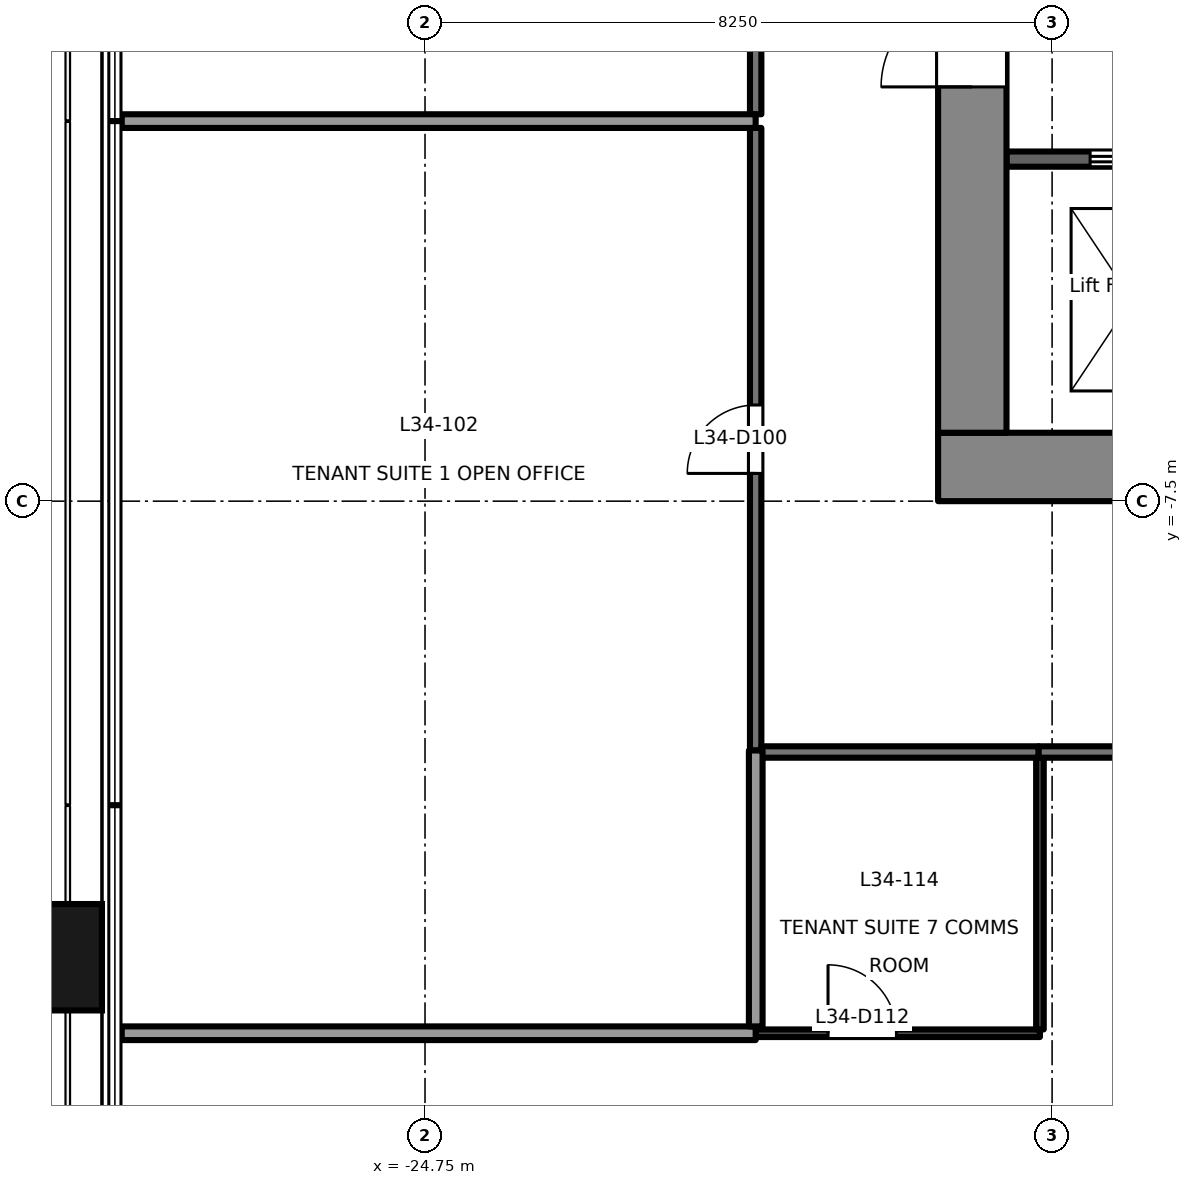
"""IFC4 building model, lengths in metres.
Left out: names, types, materials, properties, quantities, classifications, styles, units other than length and angle.
Written with IfcOpenShell. Run it as: python <this file> out.ifc"""

import sys

from ifc_helpers import new_model, si_unit, direction, frame, frame_2d, origin, origin_2d, place, context, subcontext, project, spatial, rectangle, extrude, element, fill, save


model = new_model("IFC4")
c1 = context("Model", 3, precision=1e-05, world=origin(), true_north=direction((0.0, 1.0)))
c2 = subcontext(c1, "Body", "Model", "MODEL_VIEW")
j1 = project(units=[si_unit("LENGTHUNIT", "METRE"), si_unit("PLANEANGLEUNIT", "RADIAN")], contexts=[c1])
p1 = place(None, origin())
s1 = spatial("IfcSite", under=j1, at=p1, CompositionType="ELEMENT")
p2 = place(p1, origin())
s2 = spatial("IfcBuilding", under=s1, at=p2, CompositionType="ELEMENT")
p3 = place(p2, frame((0.0, 0.0, 150.1)))
s3 = spatial("IfcBuildingStorey", under=s2, at=p3, CompositionType="ELEMENT", Elevation=150.1)
p4 = place(p3, frame((-29.9, -13.5, -0.2), z_axis=(0.0, 0.0, 1.0), x_axis=(0.0, 1.0, 0.0)))
e1 = element("IfcColumn", 1, at=p4, inside=s3, PredefinedType="COLUMN", context=c2, shape_type="SweptSolid", body=[
    extrude(rectangle(XDim=1.4, YDim=1.8, at=origin_2d()), origin(), (0.0, 0.0, 1.0), 4.0),
])
p5 = place(p3, frame((-18.0, -7.05, -0.2), z_axis=(0.0, 0.0, 1.0), x_axis=(1.0, 0.0, 0.0)))
e2 = element("IfcWall", 2, at=p5, inside=s3, PredefinedType="SHEAR", context=c2, shape_type="SweptSolid", body=[
    extrude(rectangle(XDim=36.0, YDim=0.9, at=frame_2d((18.0, 0.0))), origin(), (0.0, 0.0, 1.0), 4.0),
])
p6 = place(p5, frame((7.8, 0.0, 0.2)))
e3 = element("IfcOpeningElement", 3, at=p6, cuts=e2, PredefinedType="OPENING", context=c2, shape_type="SweptSolid", body=[
    extrude(rectangle(XDim=2.4, YDim=2.1, at=frame_2d((1.2, 1.05))), frame((0.0, 0.46, 0.0), z_axis=(0.0, -1.0, 0.0), x_axis=(1.0, 0.0, 0.0)), (0.0, 0.0, 1.0), 0.921),
])
p7 = place(p5, frame((17.4, 0.0, 0.2)))
e4 = element("IfcOpeningElement", 4, at=p7, cuts=e2, PredefinedType="OPENING", context=c2, shape_type="SweptSolid", body=[
    extrude(rectangle(XDim=1.2, YDim=2.1, at=frame_2d((0.6, 1.05))), frame((0.0, 0.46, 0.0), z_axis=(0.0, -1.0, 0.0), x_axis=(1.0, 0.0, 0.0)), (0.0, 0.0, 1.0), 0.921),
])
p8 = place(p5, frame((26.1, 0.0, 0.2)))
e5 = element("IfcOpeningElement", 5, at=p8, cuts=e2, PredefinedType="OPENING", context=c2, shape_type="SweptSolid", body=[
    extrude(rectangle(XDim=2.4, YDim=2.1, at=frame_2d((1.2, 1.05))), frame((0.0, 0.46, 0.0), z_axis=(0.0, -1.0, 0.0), x_axis=(1.0, 0.0, 0.0)), (0.0, 0.0, 1.0), 0.921),
])
p9 = place(p3, frame((-17.55, -6.6, -0.2), z_axis=(0.0, 0.0, 1.0), x_axis=(0.0, 1.0, 0.0)))
e6 = element("IfcWall", 6, at=p9, inside=s3, PredefinedType="SHEAR", context=c2, shape_type="SweptSolid", body=[
    extrude(rectangle(XDim=13.2, YDim=0.9, at=frame_2d((6.6, 0.0))), origin(), (0.0, 0.0, 1.0), 4.0),
])
p10 = place(p9, frame((4.55, 0.0, 0.2)))
e7 = element("IfcOpeningElement", 7, at=p10, cuts=e6, PredefinedType="OPENING", context=c2, shape_type="SweptSolid", body=[
    extrude(rectangle(XDim=1.2, YDim=2.1, at=frame_2d((0.6, 1.05))), frame((0.0, 0.46, 0.0), z_axis=(0.0, -1.0, 0.0), x_axis=(1.0, 0.0, 0.0)), (0.0, 0.0, 1.0), 0.921),
])
p11 = place(p3, frame((-17.1, -3.0, 0.0), z_axis=(0.0, 0.0, 1.0), x_axis=(1.0, 0.0, 0.0)))
e8 = element("IfcWall", 8, at=p11, inside=s3, PredefinedType="PARTITIONING", context=c2, shape_type="SweptSolid", body=[
    extrude(rectangle(XDim=3.3, YDim=0.2, at=frame_2d((1.65, 0.0))), origin(), (0.0, 0.0, 1.0), 3.8),
])
p12 = place(p11, frame((1.1, 0.0, 0.0)))
e9 = element("IfcOpeningElement", 9, at=p12, cuts=e8, PredefinedType="OPENING", context=c2, shape_type="SweptSolid", body=[
    extrude(rectangle(XDim=1.1, YDim=2.1, at=frame_2d((0.55, 1.05))), frame((0.0, 0.111, 0.0), z_axis=(0.0, -1.0, 0.0), x_axis=(1.0, 0.0, 0.0)), (0.0, 0.0, 1.0), 0.221),
])
p13 = place(p3, frame((-20.4, -10.78, 0.0), z_axis=(0.0, 0.0, 1.0), x_axis=(0.0, 1.0, 0.0)))
e10 = element("IfcWall", 10, at=p13, inside=s3, PredefinedType="PARTITIONING", context=c2, shape_type="SweptSolid", body=[
    extrude(rectangle(XDim=8.19, YDim=0.15, at=frame_2d((4.095, 0.0))), origin(), (0.0, 0.0, 1.0), 3.3),
])
p14 = place(p13, frame((3.645, 0.0, 0.0)))
e11 = element("IfcOpeningElement", 11, at=p14, cuts=e10, PredefinedType="OPENING", context=c2, shape_type="SweptSolid", body=[
    extrude(rectangle(XDim=0.9, YDim=2.1, at=frame_2d((0.45, 1.05))), frame((0.0, 0.085, 0.0), z_axis=(0.0, -1.0, 0.0), x_axis=(1.0, 0.0, 0.0)), (0.0, 0.0, 1.0), 0.171),
])
p15 = place(p3, frame((-20.4, -2.41, 0.0), z_axis=(0.0, 0.0, 1.0), x_axis=(0.0, 1.0, 0.0)))
e12 = element("IfcWall", 12, at=p15, inside=s3, PredefinedType="PARTITIONING", context=c2, shape_type="SweptSolid", body=[
    extrude(rectangle(XDim=9.91, YDim=0.15, at=frame_2d((4.955, 0.0))), origin(), (0.0, 0.0, 1.0), 3.3),
])
p16 = place(p15, frame((4.205, 0.0, 0.0)))
e13 = element("IfcOpeningElement", 13, at=p16, cuts=e12, PredefinedType="OPENING", context=c2, shape_type="SweptSolid", body=[
    extrude(rectangle(XDim=1.5, YDim=2.1, at=frame_2d((0.75, 1.05))), frame((0.0, 0.085, 0.0), z_axis=(0.0, -1.0, 0.0), x_axis=(1.0, 0.0, 0.0)), (0.0, 0.0, 1.0), 0.171),
])
p17 = place(p3, frame((-10.823, -10.8, 0.0), z_axis=(0.0, 0.0, 1.0), x_axis=(-1.0, 0.0, 0.0)))
e14 = element("IfcWall", 14, at=p17, inside=s3, PredefinedType="PARTITIONING", context=c2, shape_type="SweptSolid", body=[
    extrude(rectangle(XDim=5.857, YDim=0.15, at=frame_2d((2.928, 0.0))), origin(), (0.0, 0.0, 1.0), 2.9),
])
p18 = place(p17, frame((1.139, 0.0, 0.0)))
e15 = element("IfcOpeningElement", 15, at=p18, cuts=e14, PredefinedType="OPENING", context=c2, shape_type="SweptSolid", body=[
    extrude(rectangle(XDim=1.8, YDim=2.1, at=frame_2d((0.9, 1.05))), frame((0.0, 0.085, 0.0), z_axis=(0.0, -1.0, 0.0), x_axis=(1.0, 0.0, 0.0)), (0.0, 0.0, 1.0), 0.171),
])
p19 = place(p3, frame((-16.68, -10.8, 0.0), z_axis=(0.0, 0.0, 1.0), x_axis=(-1.0, 0.0, 0.0)))
e16 = element("IfcWall", 16, at=p19, inside=s3, PredefinedType="PARTITIONING", context=c2, shape_type="SweptSolid", body=[
    extrude(rectangle(XDim=3.645, YDim=0.15, at=frame_2d((1.823, 0.0))), origin(), (0.0, 0.0, 1.0), 3.8),
])
for number, where, z_axis, x_axis in (
    (17, (-28.74, -2.5, 0.0), (0.0, 0.0, 1.0), (1.0, 0.0, 0.0)),
    (18, (-20.4, -14.5, 0.0), (0.0, 0.0, 1.0), (-1.0, 0.0, 0.0)),
):
    element("IfcWall", number, at=place(p3, frame(where, z_axis=z_axis, x_axis=x_axis)), inside=s3, PredefinedType="PARTITIONING", context=c2, shape_type="SweptSolid", body=[
        extrude(rectangle(XDim=8.34, YDim=0.18, at=frame_2d((4.17, 0.0))), origin(), (0.0, 0.0, 1.0), 3.8),
    ])
p20 = place(p3, frame((-20.399, -10.78, 0.0), z_axis=(0.0, 0.0, 1.0), x_axis=(0.0, -1.0, 0.0)))
e19 = element("IfcWall", 19, at=p20, inside=s3, PredefinedType="PARTITIONING", context=c2, shape_type="SweptSolid", body=[
    extrude(rectangle(XDim=3.63, YDim=0.18, at=frame_2d((1.815, 0.0))), origin(), (0.0, 0.0, 1.0), 3.8),
])
p21 = place(p3, frame((-20.4, -14.5, 0.0), z_axis=(0.0, 0.0, 1.0), x_axis=(1.0, 0.0, 0.0)))
e20 = element("IfcWall", 20, at=p21, inside=s3, PredefinedType="PARTITIONING", context=c2, shape_type="SweptSolid", body=[
    extrude(rectangle(XDim=3.74, YDim=0.1, at=frame_2d((1.87, 0.0))), origin(), (0.0, 0.0, 1.0), 3.8),
])
p22 = place(p21, frame((0.952, 0.0, 0.0)))
e21 = element("IfcOpeningElement", 21, at=p22, cuts=e20, PredefinedType="OPENING", context=c2, shape_type="SweptSolid", body=[
    extrude(rectangle(XDim=0.9, YDim=2.1, at=frame_2d((0.45, 1.05))), frame((0.0, 0.061, 0.0), z_axis=(0.0, -1.0, 0.0), x_axis=(1.0, 0.0, 0.0)), (0.0, 0.0, 1.0), 0.121),
])
p23 = place(p3, frame((-16.66, -14.45, 0.0), z_axis=(0.0, 0.0, 1.0), x_axis=(0.0, 1.0, 0.0)))
e22 = element("IfcWall", 22, at=p23, inside=s3, PredefinedType="PARTITIONING", context=c2, shape_type="SweptSolid", body=[
    extrude(rectangle(XDim=3.575, YDim=0.1, at=frame_2d((1.788, 0.0))), origin(), (0.0, 0.0, 1.0), 3.8),
])
p24 = place(p12, origin())
e23 = element("IfcDoor", 23, at=p24, inside=s3, OperationType="DOUBLE_DOOR_SLIDING", PredefinedType="DOOR", context=c2, shape_type="SweptSolid", body=[
    extrude(rectangle(XDim=1.1, YDim=2.1, at=frame_2d((0.55, 1.05))), frame((0.0, 0.025, 0.0), z_axis=(0.0, -1.0, 0.0), x_axis=(1.0, 0.0, 0.0)), (0.0, 0.0, 1.0), 0.05),
])
fill(e9, e23)
p25 = place(p10, origin())
e24 = element("IfcDoor", 24, at=p25, inside=s3, OperationType="SINGLE_SWING_LEFT", PredefinedType="DOOR", context=c2, shape_type="SweptSolid", body=[
    extrude(rectangle(XDim=1.2, YDim=2.1, at=frame_2d((0.6, 1.05))), frame((0.0, 0.025, 0.0), z_axis=(0.0, -1.0, 0.0), x_axis=(1.0, 0.0, 0.0)), (0.0, 0.0, 1.0), 0.05),
])
fill(e7, e24)
p26 = place(p14, origin())
e25 = element("IfcDoor", 25, at=p26, inside=s3, OperationType="SINGLE_SWING_LEFT", PredefinedType="DOOR", context=c2, shape_type="SweptSolid", body=[
    extrude(rectangle(XDim=0.9, YDim=2.1, at=frame_2d((0.45, 1.05))), frame((0.0, 0.025, 0.0), z_axis=(0.0, -1.0, 0.0), x_axis=(1.0, 0.0, 0.0)), (0.0, 0.0, 1.0), 0.05),
])
fill(e11, e25)
p27 = place(p22, origin())
e26 = element("IfcDoor", 26, at=p27, inside=s3, OperationType="SINGLE_SWING_LEFT", PredefinedType="DOOR", context=c2, shape_type="SweptSolid", body=[
    extrude(rectangle(XDim=0.9, YDim=2.1, at=frame_2d((0.45, 1.05))), frame((0.0, 0.025, 0.0), z_axis=(0.0, -1.0, 0.0), x_axis=(1.0, 0.0, 0.0)), (0.0, 0.0, 1.0), 0.05),
])
fill(e21, e26)
save(model, sys.argv[1])
